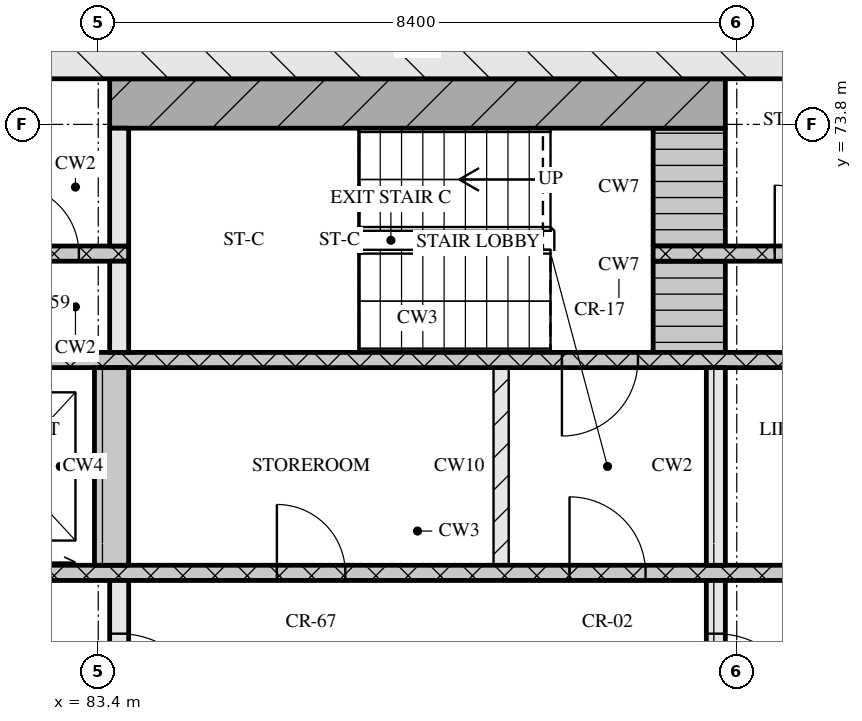
"""IFC4 building model, lengths in metres.
Left out: names, types, materials, properties, quantities, classifications, styles, units other than length and angle.
Written with IfcOpenShell. Run it as: python <this file> out.ifc"""

import sys

from ifc_helpers import new_model, si_unit, direction, frame, frame_2d, origin, place, context, subcontext, project, spatial, rectangle, extrude, element, fill, save


model = new_model("IFC4")
c1 = context("Model", 3, precision=1e-05, world=origin(), true_north=direction((0.0, 1.0)))
c2 = subcontext(c1, "Body", "Model", "MODEL_VIEW")
j1 = project(units=[si_unit("LENGTHUNIT", "METRE"), si_unit("PLANEANGLEUNIT", "RADIAN")], contexts=[c1])
p1 = place(None, origin())
s1 = spatial("IfcSite", under=j1, at=p1, CompositionType="ELEMENT")
p2 = place(p1, origin())
s2 = spatial("IfcBuilding", under=s1, at=p2, CompositionType="ELEMENT")
p3 = place(p2, frame((0.0, 0.0, 106.05)))
s3 = spatial("IfcBuildingStorey", under=s2, at=p3, CompositionType="ELEMENT", Elevation=106.05)
p4 = place(p3, frame((66.8, 74.9, 0.0), z_axis=(0.0, 0.0, 1.0), x_axis=(1.0, 0.0, 0.0)))
e1 = element("IfcWall", 1, at=p4, inside=s3, PredefinedType="SOLIDWALL", context=c2, shape_type="SweptSolid", body=[
    extrude(rectangle(XDim=41.6, YDim=1.0, at=frame_2d((20.8, 0.0))), origin(), (0.0, 0.0, 1.0), 3.32),
])
p5 = place(p3, frame((83.675, 65.2, 0.0), z_axis=(0.0, 0.0, 1.0), x_axis=(0.0, 1.0, 0.0)))
e2 = element("IfcWall", 2, at=p5, inside=s3, PredefinedType="SOLIDWALL", context=c2, shape_type="SweptSolid", body=[
    extrude(rectangle(XDim=2.6, YDim=0.25, at=frame_2d((1.3, 0.0))), origin(), (0.0, 0.0, 1.0), 3.32),
])
p6 = place(p5, frame((0.7, 0.0, 0.0)))
e3 = element("IfcOpeningElement", 3, at=p6, cuts=e2, PredefinedType="OPENING", context=c2, shape_type="SweptSolid", body=[
    extrude(rectangle(XDim=1.2, YDim=2.1, at=frame_2d((0.6, 1.05))), frame((0.0, 0.135, 0.0), z_axis=(0.0, -1.0, 0.0), x_axis=(1.0, 0.0, 0.0)), (0.0, 0.0, 1.0), 0.27),
])
p7 = place(p3, frame((91.525, 65.2, 0.0), z_axis=(0.0, 0.0, 1.0), x_axis=(0.0, 1.0, 0.0)))
e4 = element("IfcWall", 4, at=p7, inside=s3, PredefinedType="SOLIDWALL", context=c2, shape_type="SweptSolid", body=[
    extrude(rectangle(XDim=2.6, YDim=0.25, at=frame_2d((1.3, 0.0))), origin(), (0.0, 0.0, 1.0), 3.32),
])
p8 = place(p7, frame((0.7, 0.0, 0.0)))
e5 = element("IfcOpeningElement", 5, at=p8, cuts=e4, PredefinedType="OPENING", context=c2, shape_type="SweptSolid", body=[
    extrude(rectangle(XDim=1.2, YDim=2.1, at=frame_2d((0.6, 1.05))), frame((0.0, 0.135, 0.0), z_axis=(0.0, -1.0, 0.0), x_axis=(1.0, 0.0, 0.0)), (0.0, 0.0, 1.0), 0.27),
])
p9 = place(p3, frame((76.05, 67.9, 0.0), z_axis=(0.0, 0.0, 1.0), x_axis=(1.0, 0.0, 0.0)))
e6 = element("IfcWall", 6, at=p9, inside=s3, PredefinedType="SOLIDWALL", context=c2, shape_type="SweptSolid", body=[
    extrude(rectangle(XDim=23.1, YDim=0.2, at=frame_2d((11.55, 0.0))), origin(), (0.0, 0.0, 1.0), 3.32),
])
p10 = place(p9, frame((0.6, 0.0, 0.0)))
e7 = element("IfcOpeningElement", 7, at=p10, cuts=e6, PredefinedType="OPENING", context=c2, shape_type="SweptSolid", body=[
    extrude(rectangle(XDim=1.1, YDim=2.1, at=frame_2d((0.55, 1.05))), frame((0.0, 0.11, 0.0), z_axis=(0.0, -1.0, 0.0), x_axis=(1.0, 0.0, 0.0)), (0.0, 0.0, 1.0), 0.22),
])
p11 = place(p9, frame((3.1, 0.0, 0.0)))
e8 = element("IfcOpeningElement", 8, at=p11, cuts=e6, PredefinedType="OPENING", context=c2, shape_type="SweptSolid", body=[
    extrude(rectangle(XDim=1.1, YDim=2.1, at=frame_2d((0.55, 1.05))), frame((0.0, 0.11, 0.0), z_axis=(0.0, -1.0, 0.0), x_axis=(1.0, 0.0, 0.0)), (0.0, 0.0, 1.0), 0.22),
])
p12 = place(p9, frame((5.6, 0.0, 0.0)))
e9 = element("IfcOpeningElement", 9, at=p12, cuts=e6, PredefinedType="OPENING", context=c2, shape_type="SweptSolid", body=[
    extrude(rectangle(XDim=1.1, YDim=2.1, at=frame_2d((0.55, 1.05))), frame((0.0, 0.11, 0.0), z_axis=(0.0, -1.0, 0.0), x_axis=(1.0, 0.0, 0.0)), (0.0, 0.0, 1.0), 0.22),
])
p13 = place(p9, frame((9.7, 0.0, 0.0)))
e10 = element("IfcOpeningElement", 10, at=p13, cuts=e6, PredefinedType="OPENING", context=c2, shape_type="SweptSolid", body=[
    extrude(rectangle(XDim=0.9, YDim=2.1, at=frame_2d((0.45, 1.05))), frame((0.0, 0.11, 0.0), z_axis=(0.0, -1.0, 0.0), x_axis=(1.0, 0.0, 0.0)), (0.0, 0.0, 1.0), 0.22),
])
p14 = place(p9, frame((13.55, 0.0, 0.0)))
e11 = element("IfcOpeningElement", 11, at=p14, cuts=e6, PredefinedType="OPENING", context=c2, shape_type="SweptSolid", body=[
    extrude(rectangle(XDim=1.0, YDim=2.1, at=frame_2d((0.5, 1.05))), frame((0.0, 0.11, 0.0), z_axis=(0.0, -1.0, 0.0), x_axis=(1.0, 0.0, 0.0)), (0.0, 0.0, 1.0), 0.22),
])
p15 = place(p3, frame((83.575, 68.0, 0.0), z_axis=(0.0, 0.0, 1.0), x_axis=(0.0, 1.0, 0.0)))
e12 = element("IfcWall", 12, at=p15, inside=s3, PredefinedType="SOLIDWALL", context=c2, shape_type="SweptSolid", body=[
    extrude(rectangle(XDim=2.6, YDim=0.45, at=frame_2d((1.3, 0.0))), origin(), (0.0, 0.0, 1.0), 3.32),
])
p16 = place(p3, frame((88.7, 68.0, 0.0), z_axis=(0.0, 0.0, 1.0), x_axis=(0.0, 1.0, 0.0)))
e13 = element("IfcWall", 13, at=p16, inside=s3, PredefinedType="PARTITIONING", context=c2, shape_type="SweptSolid", body=[
    extrude(rectangle(XDim=2.6, YDim=0.2, at=frame_2d((1.3, 0.0))), origin(), (0.0, 0.0, 1.0), 3.32),
])
p17 = place(p3, frame((91.525, 68.0, 0.0), z_axis=(0.0, 0.0, 1.0), x_axis=(0.0, 1.0, 0.0)))
e14 = element("IfcWall", 14, at=p17, inside=s3, PredefinedType="SOLIDWALL", context=c2, shape_type="SweptSolid", body=[
    extrude(rectangle(XDim=2.6, YDim=0.25, at=frame_2d((1.3, 0.0))), origin(), (0.0, 0.0, 1.0), 3.32),
])
p18 = place(p3, frame((67.8, 70.7, 0.0), z_axis=(0.0, 0.0, 1.0), x_axis=(1.0, 0.0, 0.0)))
e15 = element("IfcWall", 15, at=p18, inside=s3, PredefinedType="SOLIDWALL", context=c2, shape_type="SweptSolid", body=[
    extrude(rectangle(XDim=39.6, YDim=0.2, at=frame_2d((19.8, 0.0))), origin(), (0.0, 0.0, 1.0), 3.32),
])
p19 = place(p18, frame((0.65, 0.0, 0.0)))
e16 = element("IfcOpeningElement", 16, at=p19, cuts=e15, PredefinedType="OPENING", context=c2, shape_type="SweptSolid", body=[
    extrude(rectangle(XDim=1.1, YDim=2.1, at=frame_2d((0.55, 1.05))), frame((0.0, 0.11, 0.0), z_axis=(0.0, -1.0, 0.0), x_axis=(1.0, 0.0, 0.0)), (0.0, 0.0, 1.0), 0.22),
])
p20 = place(p18, frame((3.25, 0.0, 0.0)))
e17 = element("IfcOpeningElement", 17, at=p20, cuts=e15, PredefinedType="OPENING", context=c2, shape_type="SweptSolid", body=[
    extrude(rectangle(XDim=1.1, YDim=2.1, at=frame_2d((0.55, 1.05))), frame((0.0, 0.11, 0.0), z_axis=(0.0, -1.0, 0.0), x_axis=(1.0, 0.0, 0.0)), (0.0, 0.0, 1.0), 0.22),
])
p21 = place(p18, frame((5.9, 0.0, 0.0)))
e18 = element("IfcOpeningElement", 18, at=p21, cuts=e15, PredefinedType="OPENING", context=c2, shape_type="SweptSolid", body=[
    extrude(rectangle(XDim=1.0, YDim=2.1, at=frame_2d((0.5, 1.05))), frame((0.0, 0.11, 0.0), z_axis=(0.0, -1.0, 0.0), x_axis=(1.0, 0.0, 0.0)), (0.0, 0.0, 1.0), 0.22),
])
p22 = place(p18, frame((21.7, 0.0, 0.0)))
e19 = element("IfcOpeningElement", 19, at=p22, cuts=e15, PredefinedType="OPENING", context=c2, shape_type="SweptSolid", body=[
    extrude(rectangle(XDim=1.0, YDim=2.1, at=frame_2d((0.5, 1.05))), frame((0.0, 0.11, 0.0), z_axis=(0.0, -1.0, 0.0), x_axis=(1.0, 0.0, 0.0)), (0.0, 0.0, 1.0), 0.22),
])
p23 = place(p18, frame((32.7, 0.0, 0.0)))
e20 = element("IfcOpeningElement", 20, at=p23, cuts=e15, PredefinedType="OPENING", context=c2, shape_type="SweptSolid", body=[
    extrude(rectangle(XDim=1.0, YDim=2.1, at=frame_2d((0.5, 1.05))), frame((0.0, 0.11, 0.0), z_axis=(0.0, -1.0, 0.0), x_axis=(1.0, 0.0, 0.0)), (0.0, 0.0, 1.0), 0.22),
])
p24 = place(p18, frame((35.25, 0.0, 0.0)))
e21 = element("IfcOpeningElement", 21, at=p24, cuts=e15, PredefinedType="OPENING", context=c2, shape_type="SweptSolid", body=[
    extrude(rectangle(XDim=1.1, YDim=2.1, at=frame_2d((0.55, 1.05))), frame((0.0, 0.11, 0.0), z_axis=(0.0, -1.0, 0.0), x_axis=(1.0, 0.0, 0.0)), (0.0, 0.0, 1.0), 0.22),
])
p25 = place(p18, frame((37.85, 0.0, 0.0)))
e22 = element("IfcOpeningElement", 22, at=p25, cuts=e15, PredefinedType="OPENING", context=c2, shape_type="SweptSolid", body=[
    extrude(rectangle(XDim=1.1, YDim=2.1, at=frame_2d((0.55, 1.05))), frame((0.0, 0.11, 0.0), z_axis=(0.0, -1.0, 0.0), x_axis=(1.0, 0.0, 0.0)), (0.0, 0.0, 1.0), 0.22),
])
p26 = place(p3, frame((83.675, 70.8, 0.0), z_axis=(0.0, 0.0, 1.0), x_axis=(0.0, 1.0, 0.0)))
e23 = element("IfcWall", 23, at=p26, inside=s3, PredefinedType="SOLIDWALL", context=c2, shape_type="SweptSolid", body=[
    extrude(rectangle(XDim=1.2, YDim=0.25, at=frame_2d((0.6, 0.0))), origin(), (0.0, 0.0, 1.0), 3.32),
])
p27 = place(p3, frame((91.175, 70.8, 0.0), z_axis=(0.0, 0.0, 1.0), x_axis=(0.0, 1.0, 0.0)))
e24 = element("IfcWall", 24, at=p27, inside=s3, PredefinedType="SOLIDWALL", context=c2, shape_type="SweptSolid", body=[
    extrude(rectangle(XDim=1.2, YDim=0.95, at=frame_2d((0.6, 0.0))), origin(), (0.0, 0.0, 1.0), 3.32),
])
p28 = place(p3, frame((72.8, 72.1, 0.0), z_axis=(0.0, 0.0, 1.0), x_axis=(1.0, 0.0, 0.0)))
e25 = element("IfcWall", 25, at=p28, inside=s3, PredefinedType="SOLIDWALL", context=c2, shape_type="SweptSolid", body=[
    extrude(rectangle(XDim=11.0, YDim=0.2, at=frame_2d((5.5, 0.0))), origin(), (0.0, 0.0, 1.0), 3.32),
])
p29 = place(p28, frame((1.25, 0.0, 0.0)))
e26 = element("IfcOpeningElement", 26, at=p29, cuts=e25, PredefinedType="OPENING", context=c2, shape_type="SweptSolid", body=[
    extrude(rectangle(XDim=0.9, YDim=2.1, at=frame_2d((0.45, 1.05))), frame((0.0, 0.11, 0.0), z_axis=(0.0, -1.0, 0.0), x_axis=(1.0, 0.0, 0.0)), (0.0, 0.0, 1.0), 0.22),
])
p30 = place(p28, frame((4.65, 0.0, 0.0)))
e27 = element("IfcOpeningElement", 27, at=p30, cuts=e25, PredefinedType="OPENING", context=c2, shape_type="SweptSolid", body=[
    extrude(rectangle(XDim=0.9, YDim=2.1, at=frame_2d((0.45, 1.05))), frame((0.0, 0.11, 0.0), z_axis=(0.0, -1.0, 0.0), x_axis=(1.0, 0.0, 0.0)), (0.0, 0.0, 1.0), 0.22),
])
p31 = place(p28, frame((7.47, 0.0, 0.0)))
e28 = element("IfcOpeningElement", 28, at=p31, cuts=e25, PredefinedType="OPENING", context=c2, shape_type="SweptSolid", body=[
    extrude(rectangle(XDim=0.9, YDim=2.1, at=frame_2d((0.45, 1.05))), frame((0.0, 0.11, 0.0), z_axis=(0.0, -1.0, 0.0), x_axis=(1.0, 0.0, 0.0)), (0.0, 0.0, 1.0), 0.22),
])
p32 = place(p28, frame((9.445, 0.0, 0.0)))
e29 = element("IfcOpeningElement", 29, at=p32, cuts=e25, PredefinedType="OPENING", context=c2, shape_type="SweptSolid", body=[
    extrude(rectangle(XDim=0.9, YDim=2.1, at=frame_2d((0.45, 1.05))), frame((0.0, 0.11, 0.0), z_axis=(0.0, -1.0, 0.0), x_axis=(1.0, 0.0, 0.0)), (0.0, 0.0, 1.0), 0.22),
])
p33 = place(p3, frame((90.7, 72.1, 0.0), z_axis=(0.0, 0.0, 1.0), x_axis=(1.0, 0.0, 0.0)))
e30 = element("IfcWall", 30, at=p33, inside=s3, PredefinedType="SOLIDWALL", context=c2, shape_type="SweptSolid", body=[
    extrude(rectangle(XDim=11.7, YDim=0.2, at=frame_2d((5.85, 0.0))), origin(), (0.0, 0.0, 1.0), 3.32),
])
p34 = place(p33, frame((1.6, 0.0, 0.0)))
e31 = element("IfcOpeningElement", 31, at=p34, cuts=e30, PredefinedType="OPENING", context=c2, shape_type="SweptSolid", body=[
    extrude(rectangle(XDim=0.9, YDim=2.1, at=frame_2d((0.45, 1.05))), frame((0.0, 0.11, 0.0), z_axis=(0.0, -1.0, 0.0), x_axis=(1.0, 0.0, 0.0)), (0.0, 0.0, 1.0), 0.22),
])
p35 = place(p33, frame((5.335, 0.0, 0.0)))
e32 = element("IfcOpeningElement", 32, at=p35, cuts=e30, PredefinedType="OPENING", context=c2, shape_type="SweptSolid", body=[
    extrude(rectangle(XDim=0.9, YDim=2.1, at=frame_2d((0.45, 1.05))), frame((0.0, 0.11, 0.0), z_axis=(0.0, -1.0, 0.0), x_axis=(1.0, 0.0, 0.0)), (0.0, 0.0, 1.0), 0.22),
])
p36 = place(p33, frame((9.55, 0.0, 0.0)))
e33 = element("IfcOpeningElement", 33, at=p36, cuts=e30, PredefinedType="OPENING", context=c2, shape_type="SweptSolid", body=[
    extrude(rectangle(XDim=0.9, YDim=2.1, at=frame_2d((0.45, 1.05))), frame((0.0, 0.11, 0.0), z_axis=(0.0, -1.0, 0.0), x_axis=(1.0, 0.0, 0.0)), (0.0, 0.0, 1.0), 0.22),
])
p37 = place(p3, frame((83.675, 72.2, 0.0), z_axis=(0.0, 0.0, 1.0), x_axis=(0.0, 1.0, 0.0)))
e34 = element("IfcWall", 34, at=p37, inside=s3, PredefinedType="SOLIDWALL", context=c2, shape_type="SweptSolid", body=[
    extrude(rectangle(XDim=1.55, YDim=0.25, at=frame_2d((0.775, 0.0))), origin(), (0.0, 0.0, 1.0), 3.32),
])
p38 = place(p3, frame((91.175, 72.2, 0.0), z_axis=(0.0, 0.0, 1.0), x_axis=(0.0, 1.0, 0.0)))
e35 = element("IfcWall", 35, at=p38, inside=s3, PredefinedType="SOLIDWALL", context=c2, shape_type="SweptSolid", body=[
    extrude(rectangle(XDim=1.55, YDim=0.95, at=frame_2d((0.775, 0.0))), origin(), (0.0, 0.0, 1.0), 3.32),
])
p39 = place(p3, frame((83.55, 74.075, 0.0), z_axis=(0.0, 0.0, 1.0), x_axis=(1.0, 0.0, 0.0)))
e36 = element("IfcWall", 36, at=p39, inside=s3, PredefinedType="SOLIDWALL", context=c2, shape_type="SweptSolid", body=[
    extrude(rectangle(XDim=8.1, YDim=0.65, at=frame_2d((4.05, 0.0))), origin(), (0.0, 0.0, 1.0), 3.32),
])
p40 = place(p6, origin())
e37 = element("IfcDoor", 37, at=p40, inside=s3, OperationType="SINGLE_SWING_RIGHT", PredefinedType="DOOR", context=c2, shape_type="SweptSolid", body=[
    extrude(rectangle(XDim=1.2, YDim=2.1, at=frame_2d((0.6, 1.05))), frame((0.0, 0.025, 0.0), z_axis=(0.0, -1.0, 0.0), x_axis=(1.0, 0.0, 0.0)), (0.0, 0.0, 1.0), 0.05),
])
fill(e3, e37)
p41 = place(p8, origin())
e38 = element("IfcDoor", 38, at=p41, inside=s3, OperationType="SINGLE_SWING_RIGHT", PredefinedType="DOOR", context=c2, shape_type="SweptSolid", body=[
    extrude(rectangle(XDim=1.2, YDim=2.1, at=frame_2d((0.6, 1.05))), frame((0.0, 0.025, 0.0), z_axis=(0.0, -1.0, 0.0), x_axis=(1.0, 0.0, 0.0)), (0.0, 0.0, 1.0), 0.05),
])
fill(e5, e38)
p42 = place(p13, origin())
e39 = element("IfcDoor", 39, at=p42, inside=s3, OperationType="SINGLE_SWING_LEFT", PredefinedType="DOOR", context=c2, shape_type="SweptSolid", body=[
    extrude(rectangle(XDim=0.9, YDim=2.1, at=frame_2d((0.45, 1.05))), frame((0.0, 0.025, 0.0), z_axis=(0.0, -1.0, 0.0), x_axis=(1.0, 0.0, 0.0)), (0.0, 0.0, 1.0), 0.05),
])
fill(e10, e39)
p43 = place(p14, origin())
e40 = element("IfcDoor", 40, at=p43, inside=s3, OperationType="SINGLE_SWING_LEFT", PredefinedType="DOOR", context=c2, shape_type="SweptSolid", body=[
    extrude(rectangle(XDim=1.0, YDim=2.1, at=frame_2d((0.5, 1.05))), frame((0.0, 0.025, 0.0), z_axis=(0.0, -1.0, 0.0), x_axis=(1.0, 0.0, 0.0)), (0.0, 0.0, 1.0), 0.05),
])
fill(e11, e40)
p44 = place(p22, origin())
e41 = element("IfcDoor", 41, at=p44, inside=s3, OperationType="SINGLE_SWING_RIGHT", PredefinedType="DOOR", context=c2, shape_type="SweptSolid", body=[
    extrude(rectangle(XDim=1.0, YDim=2.1, at=frame_2d((0.5, 1.05))), frame((0.0, 0.025, 0.0), z_axis=(0.0, -1.0, 0.0), x_axis=(1.0, 0.0, 0.0)), (0.0, 0.0, 1.0), 0.05),
])
fill(e19, e41)
p45 = place(p32, origin())
e42 = element("IfcDoor", 42, at=p45, inside=s3, OperationType="SINGLE_SWING_LEFT", PredefinedType="DOOR", context=c2, shape_type="SweptSolid", body=[
    extrude(rectangle(XDim=0.9, YDim=2.1, at=frame_2d((0.45, 1.05))), frame((0.0, 0.025, 0.0), z_axis=(0.0, -1.0, 0.0), x_axis=(1.0, 0.0, 0.0)), (0.0, 0.0, 1.0), 0.05),
])
fill(e29, e42)
p46 = place(p34, origin())
e43 = element("IfcDoor", 43, at=p46, inside=s3, OperationType="SINGLE_SWING_LEFT", PredefinedType="DOOR", context=c2, shape_type="SweptSolid", body=[
    extrude(rectangle(XDim=0.9, YDim=2.1, at=frame_2d((0.45, 1.05))), frame((0.0, 0.025, 0.0), z_axis=(0.0, -1.0, 0.0), x_axis=(1.0, 0.0, 0.0)), (0.0, 0.0, 1.0), 0.05),
])
fill(e31, e43)
save(model, sys.argv[1])
